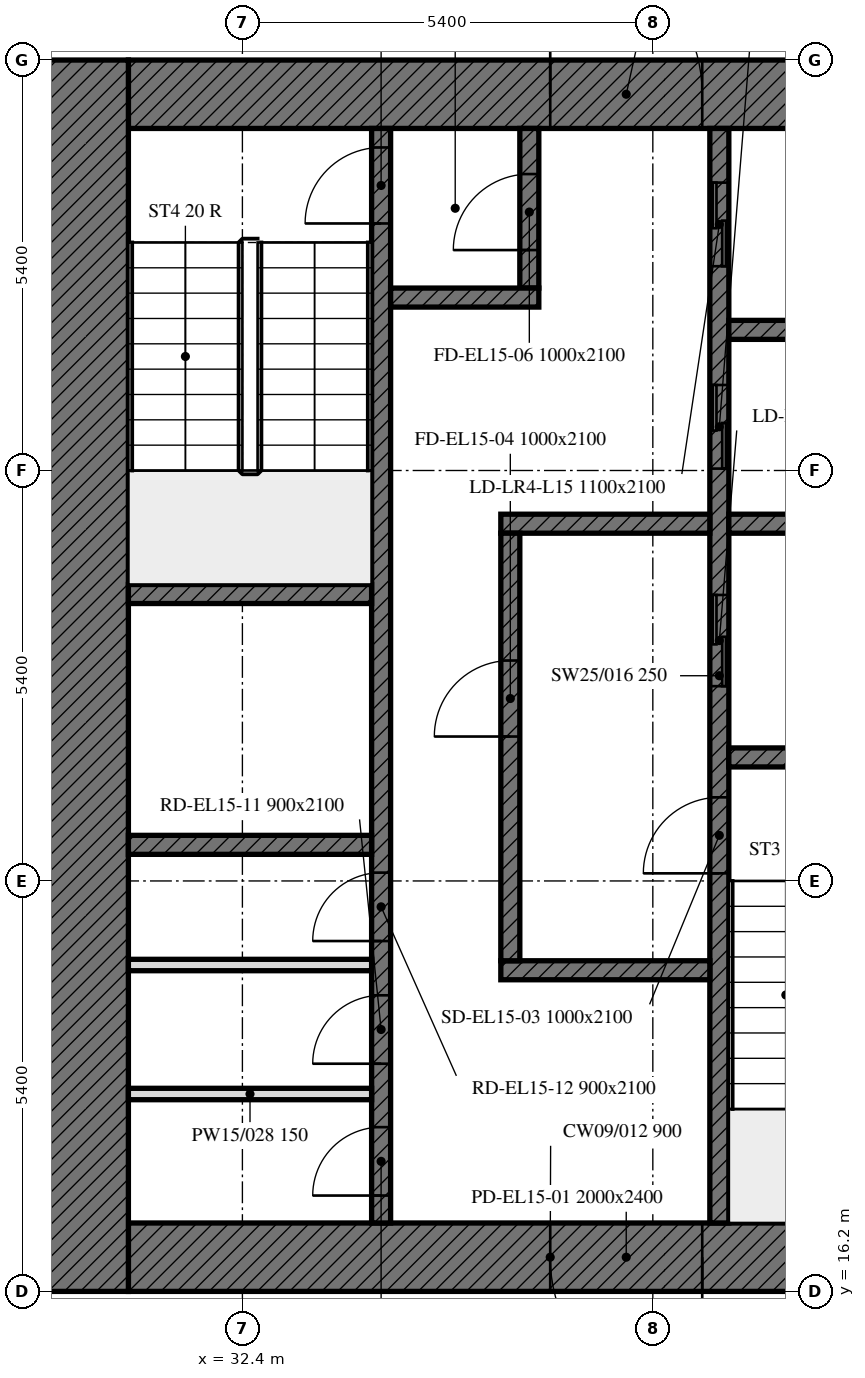
"""IFC4 building model, lengths in metres.
Left out: names, types, materials, properties, quantities, classifications, styles, units other than length and angle.
Written with IfcOpenShell. Run it as: python <this file> out.ifc"""

import sys

from ifc_helpers import new_model, si_unit, direction, frame, frame_2d, origin, place, context, subcontext, project, spatial, rectangle, extrude, element, fill, save


model = new_model("IFC4")
c1 = context("Model", 3, precision=1e-05, world=origin(), true_north=direction((0.0, 1.0)))
c2 = subcontext(c1, "Body", "Model", "MODEL_VIEW")
j1 = project(units=[si_unit("LENGTHUNIT", "METRE"), si_unit("PLANEANGLEUNIT", "RADIAN")], contexts=[c1])
p1 = place(None, origin())
s1 = spatial("IfcSite", under=j1, at=p1, CompositionType="ELEMENT")
p2 = place(p1, origin())
s2 = spatial("IfcBuilding", under=s1, at=p2, CompositionType="ELEMENT")
p3 = place(p2, frame((0.0, 0.0, 68.8)))
s3 = spatial("IfcBuildingStorey", under=s2, at=p3, CompositionType="ELEMENT", Elevation=68.8)
p4 = place(p3, frame((42.0, 16.65, 0.0), z_axis=(0.0, 0.0, 1.0), x_axis=(-1.0, 0.0, 0.0)))
e1 = element("IfcWall", 1, at=p4, inside=s3, PredefinedType="SOLIDWALL", context=c2, shape_type="SweptSolid", body=[
    extrude(rectangle(XDim=11.1, YDim=0.9, at=frame_2d((5.55, 0.0))), origin(), (0.0, 0.0, 1.0), 3.5),
])
p5 = place(p4, frame((3.55, 0.0, 0.0)))
e2 = element("IfcOpeningElement", 2, at=p5, cuts=e1, PredefinedType="OPENING", context=c2, shape_type="SweptSolid", body=[
    extrude(rectangle(XDim=2.0, YDim=2.4, at=frame_2d((1.0, 1.2))), frame((0.0, 0.45, 0.0), z_axis=(0.0, -1.0, 0.0), x_axis=(1.0, 0.0, 0.0)), (0.0, 0.0, 1.0), 0.9),
])
p6 = place(p3, frame((30.9, 31.95, 0.0), z_axis=(0.0, 0.0, 1.0), x_axis=(1.0, 0.0, 0.0)))
e3 = element("IfcWall", 3, at=p6, inside=s3, PredefinedType="SOLIDWALL", context=c2, shape_type="SweptSolid", body=[
    extrude(rectangle(XDim=11.1, YDim=0.9, at=frame_2d((5.55, 0.0))), origin(), (0.0, 0.0, 1.0), 3.5),
])
p7 = place(p6, frame((5.55, 0.0, 0.0)))
e4 = element("IfcOpeningElement", 4, at=p7, cuts=e3, PredefinedType="OPENING", context=c2, shape_type="SweptSolid", body=[
    extrude(rectangle(XDim=2.0, YDim=2.4, at=frame_2d((1.0, 1.2))), frame((0.0, 0.45, 0.0), z_axis=(0.0, -1.0, 0.0), x_axis=(1.0, 0.0, 0.0)), (0.0, 0.0, 1.0), 0.9),
])
p8 = place(p3, frame((30.3, 16.2, 0.0), z_axis=(0.0, 0.0, 1.0), x_axis=(0.0, 1.0, 0.0)))
e5 = element("IfcWall", 5, at=p8, inside=s3, PredefinedType="SOLIDWALL", context=c2, shape_type="SweptSolid", body=[
    extrude(rectangle(XDim=16.2, YDim=1.2, at=frame_2d((8.1, 0.0))), origin(), (0.0, 0.0, 1.0), 3.5),
])
p9 = place(p3, frame((38.675, 17.1, 0.0), z_axis=(0.0, 0.0, 1.0), x_axis=(0.0, 1.0, 0.0)))
e6 = element("IfcWall", 6, at=p9, inside=s3, PredefinedType="SOLIDWALL", context=c2, shape_type="SweptSolid", body=[
    extrude(rectangle(XDim=14.4, YDim=0.25, at=frame_2d((7.2, 0.0))), origin(), (0.0, 0.0, 1.0), 3.5),
])
p10 = place(p9, frame((4.6, 0.0, 0.0)))
e7 = element("IfcOpeningElement", 7, at=p10, cuts=e6, PredefinedType="OPENING", context=c2, shape_type="SweptSolid", body=[
    extrude(rectangle(XDim=1.0, YDim=2.1, at=frame_2d((0.5, 1.05))), frame((0.0, 0.125, 0.0), z_axis=(0.0, -1.0, 0.0), x_axis=(1.0, 0.0, 0.0)), (0.0, 0.0, 1.0), 0.25),
])
p11 = place(p9, frame((7.062, 0.0, 0.0)))
e8 = element("IfcOpeningElement", 8, at=p11, cuts=e6, PredefinedType="OPENING", context=c2, shape_type="SweptSolid", body=[
    extrude(rectangle(XDim=1.2, YDim=2.1, at=frame_2d((0.6, 1.05))), frame((0.0, 0.125, 0.0), z_axis=(0.0, -1.0, 0.0), x_axis=(1.0, 0.0, 0.0)), (0.0, 0.0, 1.0), 0.25),
])
p12 = place(p9, frame((9.925, 0.0, 0.0)))
e9 = element("IfcOpeningElement", 9, at=p12, cuts=e6, PredefinedType="OPENING", context=c2, shape_type="SweptSolid", body=[
    extrude(rectangle(XDim=1.1, YDim=2.1, at=frame_2d((0.55, 1.05))), frame((0.0, 0.125, 0.0), z_axis=(0.0, -1.0, 0.0), x_axis=(1.0, 0.0, 0.0)), (0.0, 0.0, 1.0), 0.25),
])
p13 = place(p9, frame((12.587, 0.0, 0.0)))
e10 = element("IfcOpeningElement", 10, at=p13, cuts=e6, PredefinedType="OPENING", context=c2, shape_type="SweptSolid", body=[
    extrude(rectangle(XDim=1.1, YDim=2.1, at=frame_2d((0.55, 1.05))), frame((0.0, 0.125, 0.0), z_axis=(0.0, -1.0, 0.0), x_axis=(1.0, 0.0, 0.0)), (0.0, 0.0, 1.0), 0.25),
])
p14 = place(p3, frame((34.225, 17.1, 0.0), z_axis=(0.0, 0.0, 1.0), x_axis=(0.0, 1.0, 0.0)))
e11 = element("IfcWall", 11, at=p14, inside=s3, PredefinedType="SOLIDWALL", context=c2, shape_type="SweptSolid", body=[
    extrude(rectangle(XDim=14.4, YDim=0.25, at=frame_2d((7.2, 0.0))), origin(), (0.0, 0.0, 1.0), 3.5),
])
p15 = place(p14, frame((13.15, 0.0, 0.0)))
e12 = element("IfcOpeningElement", 12, at=p15, cuts=e11, PredefinedType="OPENING", context=c2, shape_type="SweptSolid", body=[
    extrude(rectangle(XDim=1.0, YDim=2.1, at=frame_2d((0.5, 1.05))), frame((0.0, 0.125, 0.0), z_axis=(0.0, -1.0, 0.0), x_axis=(1.0, 0.0, 0.0)), (0.0, 0.0, 1.0), 0.25),
])
p16 = place(p14, frame((0.361, 0.0, 0.0)))
e13 = element("IfcOpeningElement", 13, at=p16, cuts=e11, PredefinedType="OPENING", context=c2, shape_type="SweptSolid", body=[
    extrude(rectangle(XDim=0.9, YDim=2.1, at=frame_2d((0.45, 1.05))), frame((0.0, 0.125, 0.0), z_axis=(0.0, -1.0, 0.0), x_axis=(1.0, 0.0, 0.0)), (0.0, 0.0, 1.0), 0.25),
])
p17 = place(p14, frame((2.095, 0.0, 0.0)))
e14 = element("IfcOpeningElement", 14, at=p17, cuts=e11, PredefinedType="OPENING", context=c2, shape_type="SweptSolid", body=[
    extrude(rectangle(XDim=0.9, YDim=2.1, at=frame_2d((0.45, 1.05))), frame((0.0, 0.125, 0.0), z_axis=(0.0, -1.0, 0.0), x_axis=(1.0, 0.0, 0.0)), (0.0, 0.0, 1.0), 0.25),
])
p18 = place(p14, frame((3.709, 0.0, 0.0)))
e15 = element("IfcOpeningElement", 15, at=p18, cuts=e11, PredefinedType="OPENING", context=c2, shape_type="SweptSolid", body=[
    extrude(rectangle(XDim=0.9, YDim=2.1, at=frame_2d((0.45, 1.05))), frame((0.0, 0.125, 0.0), z_axis=(0.0, -1.0, 0.0), x_axis=(1.0, 0.0, 0.0)), (0.0, 0.0, 1.0), 0.25),
])
p19 = place(p3, frame((38.8, 23.225, 0.0), z_axis=(0.0, 0.0, 1.0), x_axis=(1.0, 0.0, 0.0)))
e16 = element("IfcWall", 16, at=p19, inside=s3, PredefinedType="SOLIDWALL", context=c2, shape_type="SweptSolid", body=[
    extrude(rectangle(XDim=3.2, YDim=0.25, at=frame_2d((1.6, 0.0))), origin(), (0.0, 0.0, 1.0), 3.5),
])
for number, where, z_axis, x_axis in (
    (17, (30.9, 25.375, 0.0), (0.0, 0.0, 1.0), (1.0, 0.0, 0.0)),
    (18, (30.9, 22.075, 0.0), (0.0, 0.0, 1.0), (1.0, 0.0, 0.0)),
):
    element("IfcWall", number, at=place(p3, frame(where, z_axis=z_axis, x_axis=x_axis)), inside=s3, PredefinedType="SOLIDWALL", context=c2, shape_type="SweptSolid", body=[
        extrude(rectangle(XDim=3.2, YDim=0.25, at=frame_2d((1.6, 0.0))), origin(), (0.0, 0.0, 1.0), 3.5),
    ])
p20 = place(p3, frame((38.8, 26.3, 0.0), z_axis=(0.0, 0.0, 1.0), x_axis=(1.0, 0.0, 0.0)))
e19 = element("IfcWall", 19, at=p20, inside=s3, PredefinedType="SOLIDWALL", context=c2, shape_type="SweptSolid", body=[
    extrude(rectangle(XDim=3.2, YDim=0.25, at=frame_2d((1.6, 0.0))), origin(), (0.0, 0.0, 1.0), 3.5),
])
for number, where, z_axis, x_axis in (
    (20, (35.8, 26.3, 0.0), (0.0, 0.0, 1.0), (1.0, 0.0, 0.0)),
    (21, (35.8, 20.425, 0.0), (0.0, 0.0, 1.0), (1.0, 0.0, 0.0)),
):
    element("IfcWall", number, at=place(p3, frame(where, z_axis=z_axis, x_axis=x_axis)), inside=s3, PredefinedType="SOLIDWALL", context=c2, shape_type="SweptSolid", body=[
        extrude(rectangle(XDim=2.75, YDim=0.25, at=frame_2d((1.375, 0.0))), origin(), (0.0, 0.0, 1.0), 3.5),
    ])
p21 = place(p3, frame((36.175, 29.4, 0.0), z_axis=(0.0, 0.0, 1.0), x_axis=(0.0, 1.0, 0.0)))
e22 = element("IfcWall", 22, at=p21, inside=s3, PredefinedType="SOLIDWALL", context=c2, shape_type="SweptSolid", body=[
    extrude(rectangle(XDim=2.1, YDim=0.25, at=frame_2d((1.05, 0.0))), origin(), (0.0, 0.0, 1.0), 3.5),
])
p22 = place(p21, frame((0.5, 0.0, 0.0)))
e23 = element("IfcOpeningElement", 23, at=p22, cuts=e22, PredefinedType="OPENING", context=c2, shape_type="SweptSolid", body=[
    extrude(rectangle(XDim=1.0, YDim=2.1, at=frame_2d((0.5, 1.05))), frame((0.0, 0.125, 0.0), z_axis=(0.0, -1.0, 0.0), x_axis=(1.0, 0.0, 0.0)), (0.0, 0.0, 1.0), 0.25),
])
p23 = place(p3, frame((34.35, 29.275, 0.0), z_axis=(0.0, 0.0, 1.0), x_axis=(1.0, 0.0, 0.0)))
e24 = element("IfcWall", 24, at=p23, inside=s3, PredefinedType="SOLIDWALL", context=c2, shape_type="SweptSolid", body=[
    extrude(rectangle(XDim=1.95, YDim=0.25, at=frame_2d((0.975, 0.0))), origin(), (0.0, 0.0, 1.0), 3.5),
])
p24 = place(p3, frame((35.925, 20.55, 0.0), z_axis=(0.0, 0.0, 1.0), x_axis=(0.0, 1.0, 0.0)))
e25 = element("IfcWall", 25, at=p24, inside=s3, PredefinedType="SOLIDWALL", context=c2, shape_type="SweptSolid", body=[
    extrude(rectangle(XDim=5.625, YDim=0.25, at=frame_2d((2.812, 0.0))), origin(), (0.0, 0.0, 1.0), 3.5),
])
p25 = place(p24, frame((2.95, 0.0, 0.0)))
e26 = element("IfcOpeningElement", 26, at=p25, cuts=e25, PredefinedType="OPENING", context=c2, shape_type="SweptSolid", body=[
    extrude(rectangle(XDim=1.0, YDim=2.1, at=frame_2d((0.5, 1.05))), frame((0.0, 0.125, 0.0), z_axis=(0.0, -1.0, 0.0), x_axis=(1.0, 0.0, 0.0)), (0.0, 0.0, 1.0), 0.25),
])
p26 = place(p3, frame((38.8, 28.85, 0.0), z_axis=(0.0, 0.0, 1.0), x_axis=(1.0, 0.0, 0.0)))
e27 = element("IfcWall", 27, at=p26, inside=s3, PredefinedType="SOLIDWALL", context=c2, shape_type="SweptSolid", body=[
    extrude(rectangle(XDim=3.2, YDim=0.25, at=frame_2d((1.6, 0.0))), origin(), (0.0, 0.0, 1.0), 3.5),
])
for number, where, z_axis, x_axis in (
    (28, (30.9, 18.797, 0.0), (0.0, 0.0, 1.0), (1.0, 0.0, 0.0)),
    (29, (30.9, 20.494, 0.0), (0.0, 0.0, 1.0), (1.0, 0.0, 0.0)),
):
    element("IfcWall", number, at=place(p3, frame(where, z_axis=z_axis, x_axis=x_axis)), inside=s3, PredefinedType="PARTITIONING", context=c2, shape_type="SweptSolid", body=[
        extrude(rectangle(XDim=3.2, YDim=0.15, at=frame_2d((1.6, 0.0))), origin(), (0.0, 0.0, 1.0), 3.5),
    ])
p27 = place(p5, origin())
e30 = element("IfcDoor", 30, at=p27, inside=s3, OperationType="DOUBLE_DOOR_SINGLE_SWING", PredefinedType="DOOR", context=c2, shape_type="SweptSolid", body=[
    extrude(rectangle(XDim=2.0, YDim=2.4, at=frame_2d((1.0, 1.2))), frame((0.0, 0.025, 0.0), z_axis=(0.0, -1.0, 0.0), x_axis=(1.0, 0.0, 0.0)), (0.0, 0.0, 1.0), 0.05),
])
fill(e2, e30)
p28 = place(p7, origin())
e31 = element("IfcDoor", 31, at=p28, inside=s3, OperationType="DOUBLE_DOOR_SINGLE_SWING", PredefinedType="DOOR", context=c2, shape_type="SweptSolid", body=[
    extrude(rectangle(XDim=2.0, YDim=2.4, at=frame_2d((1.0, 1.2))), frame((0.0, 0.025, 0.0), z_axis=(0.0, -1.0, 0.0), x_axis=(1.0, 0.0, 0.0)), (0.0, 0.0, 1.0), 0.05),
])
fill(e4, e31)
p29 = place(p10, origin())
e32 = element("IfcDoor", 32, at=p29, inside=s3, OperationType="SINGLE_SWING_LEFT", PredefinedType="DOOR", context=c2, shape_type="SweptSolid", body=[
    extrude(rectangle(XDim=1.0, YDim=2.1, at=frame_2d((0.5, 1.05))), frame((0.0, 0.025, 0.0), z_axis=(0.0, -1.0, 0.0), x_axis=(1.0, 0.0, 0.0)), (0.0, 0.0, 1.0), 0.05),
])
fill(e7, e32)
p30 = place(p25, origin())
e33 = element("IfcDoor", 33, at=p30, inside=s3, OperationType="SINGLE_SWING_LEFT", PredefinedType="DOOR", context=c2, shape_type="SweptSolid", body=[
    extrude(rectangle(XDim=1.0, YDim=2.1, at=frame_2d((0.5, 1.05))), frame((0.0, 0.025, 0.0), z_axis=(0.0, -1.0, 0.0), x_axis=(1.0, 0.0, 0.0)), (0.0, 0.0, 1.0), 0.05),
])
fill(e26, e33)
p31 = place(p15, origin())
e34 = element("IfcDoor", 34, at=p31, inside=s3, OperationType="SINGLE_SWING_LEFT", PredefinedType="DOOR", context=c2, shape_type="SweptSolid", body=[
    extrude(rectangle(XDim=1.0, YDim=2.1, at=frame_2d((0.5, 1.05))), frame((0.0, 0.025, 0.0), z_axis=(0.0, -1.0, 0.0), x_axis=(1.0, 0.0, 0.0)), (0.0, 0.0, 1.0), 0.05),
])
fill(e12, e34)
p32 = place(p22, origin())
e35 = element("IfcDoor", 35, at=p32, inside=s3, OperationType="SINGLE_SWING_LEFT", PredefinedType="DOOR", context=c2, shape_type="SweptSolid", body=[
    extrude(rectangle(XDim=1.0, YDim=2.1, at=frame_2d((0.5, 1.05))), frame((0.0, 0.025, 0.0), z_axis=(0.0, -1.0, 0.0), x_axis=(1.0, 0.0, 0.0)), (0.0, 0.0, 1.0), 0.05),
])
fill(e23, e35)
p33 = place(p11, origin())
e36 = element("IfcDoor", 36, at=p33, inside=s3, OperationType="DOUBLE_DOOR_SLIDING", PredefinedType="DOOR", context=c2, shape_type="SweptSolid", body=[
    extrude(rectangle(XDim=1.2, YDim=2.1, at=frame_2d((0.6, 1.05))), frame((0.0, 0.025, 0.0), z_axis=(0.0, -1.0, 0.0), x_axis=(1.0, 0.0, 0.0)), (0.0, 0.0, 1.0), 0.05),
])
fill(e8, e36)
p34 = place(p12, origin())
e37 = element("IfcDoor", 37, at=p34, inside=s3, OperationType="DOUBLE_DOOR_SLIDING", PredefinedType="DOOR", context=c2, shape_type="SweptSolid", body=[
    extrude(rectangle(XDim=1.1, YDim=2.1, at=frame_2d((0.55, 1.05))), frame((0.0, 0.025, 0.0), z_axis=(0.0, -1.0, 0.0), x_axis=(1.0, 0.0, 0.0)), (0.0, 0.0, 1.0), 0.05),
])
fill(e9, e37)
p35 = place(p13, origin())
e38 = element("IfcDoor", 38, at=p35, inside=s3, OperationType="DOUBLE_DOOR_SLIDING", PredefinedType="DOOR", context=c2, shape_type="SweptSolid", body=[
    extrude(rectangle(XDim=1.1, YDim=2.1, at=frame_2d((0.55, 1.05))), frame((0.0, 0.025, 0.0), z_axis=(0.0, -1.0, 0.0), x_axis=(1.0, 0.0, 0.0)), (0.0, 0.0, 1.0), 0.05),
])
fill(e10, e38)
p36 = place(p16, origin())
e39 = element("IfcDoor", 39, at=p36, inside=s3, OperationType="SINGLE_SWING_LEFT", PredefinedType="DOOR", context=c2, shape_type="SweptSolid", body=[
    extrude(rectangle(XDim=0.9, YDim=2.1, at=frame_2d((0.45, 1.05))), frame((0.0, 0.025, 0.0), z_axis=(0.0, -1.0, 0.0), x_axis=(1.0, 0.0, 0.0)), (0.0, 0.0, 1.0), 0.05),
])
fill(e13, e39)
p37 = place(p17, origin())
e40 = element("IfcDoor", 40, at=p37, inside=s3, OperationType="SINGLE_SWING_LEFT", PredefinedType="DOOR", context=c2, shape_type="SweptSolid", body=[
    extrude(rectangle(XDim=0.9, YDim=2.1, at=frame_2d((0.45, 1.05))), frame((0.0, 0.025, 0.0), z_axis=(0.0, -1.0, 0.0), x_axis=(1.0, 0.0, 0.0)), (0.0, 0.0, 1.0), 0.05),
])
fill(e14, e40)
p38 = place(p18, origin())
e41 = element("IfcDoor", 41, at=p38, inside=s3, OperationType="SINGLE_SWING_LEFT", PredefinedType="DOOR", context=c2, shape_type="SweptSolid", body=[
    extrude(rectangle(XDim=0.9, YDim=2.1, at=frame_2d((0.45, 1.05))), frame((0.0, 0.025, 0.0), z_axis=(0.0, -1.0, 0.0), x_axis=(1.0, 0.0, 0.0)), (0.0, 0.0, 1.0), 0.05),
])
fill(e15, e41)
save(model, sys.argv[1])
